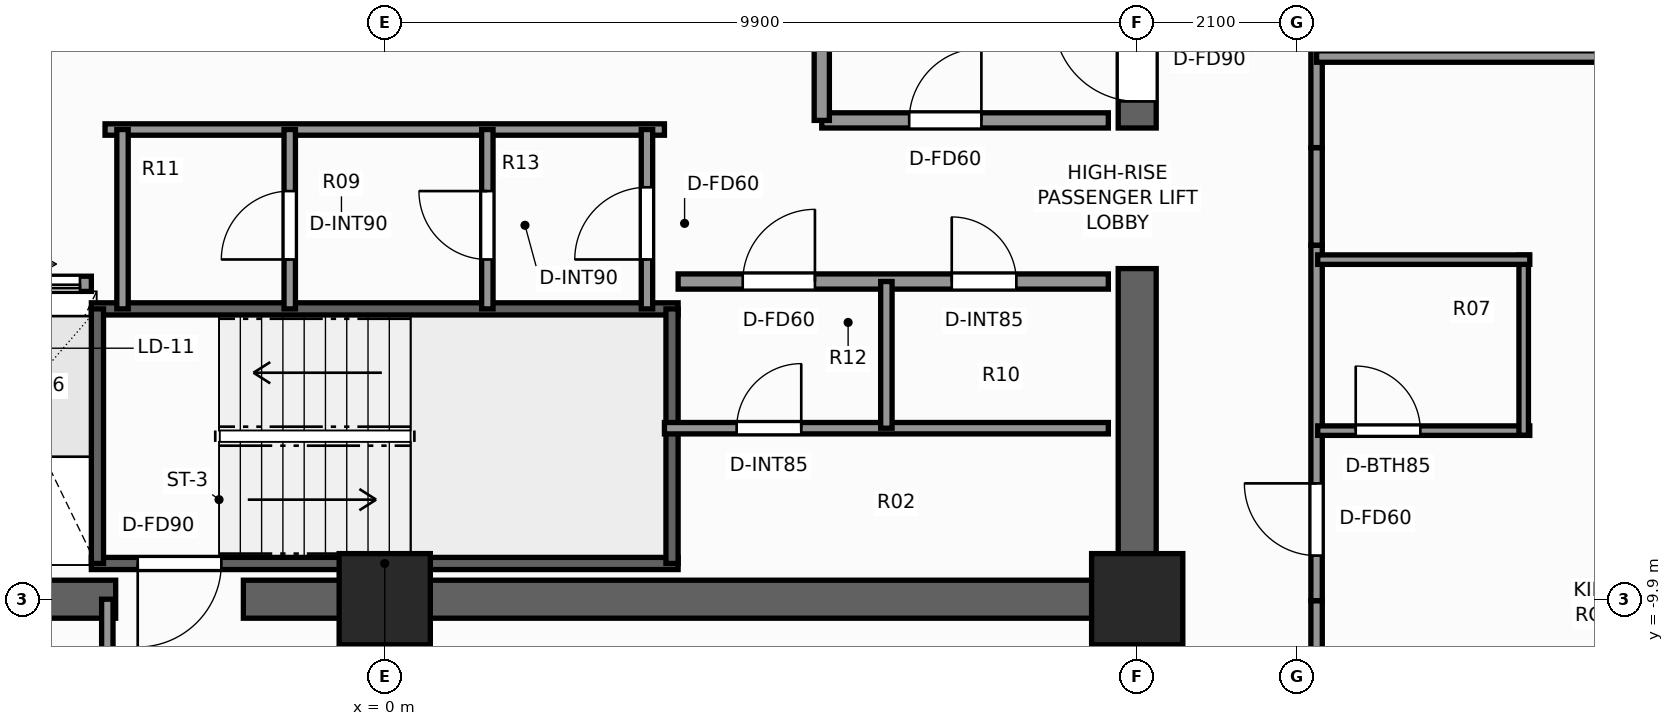
"""IFC4 building model, lengths in metres.
Left out: names, types, materials, properties, quantities, classifications, styles, units other than length and angle.
Written with IfcOpenShell. Run it as: python <this file> out.ifc"""

import sys

from ifc_helpers import new_model, si_unit, direction, frame, frame_2d, origin, origin_2d, place, context, subcontext, project, spatial, rectangle, extrude, element, fill, save


model = new_model("IFC4")
c1 = context("Model", 3, precision=1e-05, world=origin(), true_north=direction((0.0, 1.0)))
c2 = subcontext(c1, "Body", "Model", "MODEL_VIEW")
j1 = project(units=[si_unit("LENGTHUNIT", "METRE"), si_unit("PLANEANGLEUNIT", "RADIAN")], contexts=[c1])
p1 = place(None, origin())
s1 = spatial("IfcSite", under=j1, at=p1, CompositionType="ELEMENT")
p2 = place(p1, origin())
s2 = spatial("IfcBuilding", under=s1, at=p2, CompositionType="ELEMENT")
p3 = place(p2, frame((0.0, 0.0, 125.0)))
s3 = spatial("IfcBuildingStorey", under=s2, at=p3, CompositionType="ELEMENT", Elevation=125.0)
p4 = place(p3, frame((10.15, -9.9, 0.0), z_axis=(0.0, 0.0, 1.0), x_axis=(-1.0, 0.0, 0.0)))
e1 = element("IfcWall", 1, at=p4, inside=s3, PredefinedType="SHEAR", context=c2, shape_type="SweptSolid", body=[
    extrude(rectangle(XDim=12.01, YDim=0.5, at=frame_2d((6.005, 0.0))), origin(), (0.0, 0.0, 1.0), 3.3),
])
p5 = place(p3, frame((-3.54, -9.9, 0.0), z_axis=(0.0, 0.0, 1.0), x_axis=(-1.0, 0.0, 0.0)))
e2 = element("IfcWall", 2, at=p5, inside=s3, PredefinedType="SHEAR", context=c2, shape_type="SweptSolid", body=[
    extrude(rectangle(XDim=6.61, YDim=0.5, at=frame_2d((3.305, 0.0))), origin(), (0.0, 0.0, 1.0), 3.3),
])
p6 = place(p3, frame((9.9, -9.65, 0.0), z_axis=(0.0, 0.0, 1.0), x_axis=(0.0, 1.0, 0.0)))
e3 = element("IfcWall", 3, at=p6, inside=s3, PredefinedType="SHEAR", context=c2, shape_type="SweptSolid", body=[
    extrude(rectangle(XDim=4.1, YDim=0.5, at=frame_2d((2.05, 0.0))), origin(), (0.0, 0.0, 1.0), 3.3),
])
p7 = place(p3, frame((9.9, -3.7, 0.0), z_axis=(0.0, 0.0, 1.0), x_axis=(0.0, 1.0, 0.0)))
e4 = element("IfcWall", 4, at=p7, inside=s3, PredefinedType="SHEAR", context=c2, shape_type="SweptSolid", body=[
    extrude(rectangle(XDim=13.35, YDim=0.5, at=frame_2d((6.675, 0.0))), origin(), (0.0, 0.0, 1.0), 3.3),
])
p8 = place(p7, frame((0.35, 0.0, 0.0)))
e5 = element("IfcOpeningElement", 5, at=p8, cuts=e4, PredefinedType="OPENING", context=c2, shape_type="SweptSolid", body=[
    extrude(rectangle(XDim=1.1, YDim=2.2, at=frame_2d((0.55, 1.1))), frame((0.0, 0.26, 0.0), z_axis=(0.0, -1.0, 0.0), x_axis=(1.0, 0.0, 0.0)), (0.0, 0.0, 1.0), 0.52),
])
for number, where, z_axis, x_axis in (
    (6, (9.9, -9.9, 0.0), (0.0, 0.0, 1.0), (1.0, 0.0, 0.0)),
    (7, (0.0, -9.9, 0.0), (0.0, 0.0, 1.0), (1.0, 0.0, 0.0)),
):
    element("IfcColumn", number, at=place(p3, frame(where, z_axis=z_axis, x_axis=x_axis)), inside=s3, PredefinedType="COLUMN", context=c2, shape_type="SweptSolid", body=[
        extrude(rectangle(XDim=1.2, YDim=1.2, at=origin_2d()), origin(), (0.0, 0.0, 1.0), 3.3),
    ])
p9 = place(p3, frame((3.86, -9.43, 0.0), z_axis=(0.0, 0.0, 1.0), x_axis=(-1.0, 0.0, 0.0)))
e8 = element("IfcWall", 8, at=p9, inside=s3, PredefinedType="SHEAR", context=c2, shape_type="SweptSolid", body=[
    extrude(rectangle(XDim=7.72, YDim=0.16, at=frame_2d((3.86, 0.0))), origin(), (0.0, 0.0, 1.0), 3.3),
])
p10 = place(p9, frame((6.01, 0.0, 0.0)))
e9 = element("IfcOpeningElement", 9, at=p10, cuts=e8, PredefinedType="OPENING", context=c2, shape_type="SweptSolid", body=[
    extrude(rectangle(XDim=1.1, YDim=2.2, at=frame_2d((0.55, 1.1))), frame((0.0, 0.09, 0.0), z_axis=(0.0, -1.0, 0.0), x_axis=(1.0, 0.0, 0.0)), (0.0, 0.0, 1.0), 0.18),
])
p11 = place(p3, frame((-3.86, -6.08, 0.0), z_axis=(0.0, 0.0, 1.0), x_axis=(1.0, 0.0, 0.0)))
e10 = element("IfcWall", 10, at=p11, inside=s3, PredefinedType="SHEAR", context=c2, shape_type="SweptSolid", body=[
    extrude(rectangle(XDim=7.72, YDim=0.16, at=frame_2d((3.86, 0.0))), origin(), (0.0, 0.0, 1.0), 3.3),
])
for number, where, z_axis, x_axis in (
    (11, (-3.78, -9.43, 0.0), (0.0, 0.0, 1.0), (0.0, 1.0, 0.0)),
    (12, (3.78, -9.43, 0.0), (0.0, 0.0, 1.0), (0.0, 1.0, 0.0)),
):
    element("IfcWall", number, at=place(p3, frame(where, z_axis=z_axis, x_axis=x_axis)), inside=s3, PredefinedType="SHEAR", context=c2, shape_type="SweptSolid", body=[
        extrude(rectangle(XDim=3.35, YDim=0.16, at=frame_2d((1.675, 0.0))), origin(), (0.0, 0.0, 1.0), 3.3),
    ])
p12 = place(p3, frame((5.75, -3.6, 0.0), z_axis=(0.0, 0.0, 1.0), x_axis=(1.0, 0.0, 0.0)))
e13 = element("IfcWall", 13, at=p12, inside=s3, PredefinedType="SOLIDWALL", context=c2, shape_type="SweptSolid", body=[
    extrude(rectangle(XDim=3.77, YDim=0.2, at=frame_2d((1.885, 0.0))), origin(), (0.0, 0.0, 1.0), 3.1),
])
p13 = place(p12, frame((1.15, 0.0, 0.0)))
e14 = element("IfcOpeningElement", 14, at=p13, cuts=e13, PredefinedType="OPENING", context=c2, shape_type="SweptSolid", body=[
    extrude(rectangle(XDim=0.95, YDim=2.06, at=frame_2d((0.475, 1.03))), frame((0.0, 0.11, 0.0), z_axis=(0.0, -1.0, 0.0), x_axis=(1.0, 0.0, 0.0)), (0.0, 0.0, 1.0), 0.22),
])
p14 = place(p3, frame((5.75, -3.6, 0.0), z_axis=(0.0, 0.0, 1.0), x_axis=(0.0, 1.0, 0.0)))
e15 = element("IfcWall", 15, at=p14, inside=s3, PredefinedType="SOLIDWALL", context=c2, shape_type="SweptSolid", body=[
    extrude(rectangle(XDim=5.57, YDim=0.2, at=frame_2d((2.785, 0.0))), origin(), (0.0, 0.0, 1.0), 2.735),
])
p15 = place(p14, frame((2.75, 0.0, 0.0)))
e16 = element("IfcOpeningElement", 16, at=p15, cuts=e15, PredefinedType="OPENING", context=c2, shape_type="SweptSolid", body=[
    extrude(rectangle(XDim=1.1, YDim=2.2, at=frame_2d((0.55, 1.1))), frame((0.0, 0.11, 0.0), z_axis=(0.0, -1.0, 0.0), x_axis=(1.0, 0.0, 0.0)), (0.0, 0.0, 1.0), 0.22),
])
p16 = place(p3, frame((-9.52, -5.75, 0.0), z_axis=(0.0, 0.0, 1.0), x_axis=(1.0, 0.0, 0.0)))
e17 = element("IfcWall", 17, at=p16, inside=s3, PredefinedType="SOLIDWALL", context=c2, shape_type="SweptSolid", body=[
    extrude(rectangle(XDim=5.66, YDim=0.2, at=frame_2d((2.83, 0.0))), origin(), (0.0, 0.0, 1.0), 3.1),
])
p17 = place(p16, frame((0.55, 0.0, 0.0)))
e18 = element("IfcOpeningElement", 18, at=p17, cuts=e17, PredefinedType="OPENING", context=c2, shape_type="SweptSolid", body=[
    extrude(rectangle(XDim=1.1, YDim=2.2, at=frame_2d((0.55, 1.1))), frame((0.0, 0.11, 0.0), z_axis=(0.0, -1.0, 0.0), x_axis=(1.0, 0.0, 0.0)), (0.0, 0.0, 1.0), 0.22),
])
p18 = place(p16, frame((2.48, 0.0, 0.0)))
e19 = element("IfcOpeningElement", 19, at=p18, cuts=e17, PredefinedType="OPENING", context=c2, shape_type="SweptSolid", body=[
    extrude(rectangle(XDim=1.1, YDim=2.2, at=frame_2d((0.55, 1.1))), frame((0.0, 0.11, 0.0), z_axis=(0.0, -1.0, 0.0), x_axis=(1.0, 0.0, 0.0)), (0.0, 0.0, 1.0), 0.22),
])
p19 = place(p16, frame((4.41, 0.0, 0.0)))
e20 = element("IfcOpeningElement", 20, at=p19, cuts=e17, PredefinedType="OPENING", context=c2, shape_type="SweptSolid", body=[
    extrude(rectangle(XDim=1.1, YDim=2.2, at=frame_2d((0.55, 1.1))), frame((0.0, 0.11, 0.0), z_axis=(0.0, -1.0, 0.0), x_axis=(1.0, 0.0, 0.0)), (0.0, 0.0, 1.0), 0.22),
])
p20 = place(p3, frame((3.86, -5.72, 0.0), z_axis=(0.0, 0.0, 1.0), x_axis=(1.0, 0.0, 0.0)))
e21 = element("IfcWall", 21, at=p20, inside=s3, PredefinedType="SOLIDWALL", context=c2, shape_type="SweptSolid", body=[
    extrude(rectangle(XDim=5.66, YDim=0.2, at=frame_2d((2.83, 0.0))), origin(), (0.0, 0.0, 1.0), 3.1),
])
p21 = place(p20, frame((0.85, 0.0, 0.0)))
e22 = element("IfcOpeningElement", 22, at=p21, cuts=e21, PredefinedType="OPENING", context=c2, shape_type="SweptSolid", body=[
    extrude(rectangle(XDim=0.95, YDim=2.06, at=frame_2d((0.475, 1.03))), frame((0.0, 0.11, 0.0), z_axis=(0.0, -1.0, 0.0), x_axis=(1.0, 0.0, 0.0)), (0.0, 0.0, 1.0), 0.22),
])
p22 = place(p20, frame((3.6, 0.0, 0.0)))
e23 = element("IfcOpeningElement", 23, at=p22, cuts=e21, PredefinedType="OPENING", context=c2, shape_type="SweptSolid", body=[
    extrude(rectangle(XDim=0.85, YDim=2.03, at=frame_2d((0.425, 1.015))), frame((0.0, 0.11, 0.0), z_axis=(0.0, -1.0, 0.0), x_axis=(1.0, 0.0, 0.0)), (0.0, 0.0, 1.0), 0.22),
])
p23 = place(p3, frame((3.68, -7.65, 0.0), z_axis=(0.0, 0.0, 1.0), x_axis=(1.0, 0.0, 0.0)))
e24 = element("IfcWall", 24, at=p23, inside=s3, PredefinedType="PARTITIONING", context=c2, shape_type="SweptSolid", body=[
    extrude(rectangle(XDim=5.84, YDim=0.15, at=frame_2d((2.92, 0.0))), origin(), (0.0, 0.0, 1.0), 3.1),
])
p24 = place(p23, frame((0.95, 0.0, 0.0)))
e25 = element("IfcOpeningElement", 25, at=p24, cuts=e24, PredefinedType="OPENING", context=c2, shape_type="SweptSolid", body=[
    extrude(rectangle(XDim=0.85, YDim=2.03, at=frame_2d((0.425, 1.015))), frame((0.0, 0.085, 0.0), z_axis=(0.0, -1.0, 0.0), x_axis=(1.0, 0.0, 0.0)), (0.0, 0.0, 1.0), 0.17),
])
p25 = place(p3, frame((6.6, -7.65, 0.0), z_axis=(0.0, 0.0, 1.0), x_axis=(0.0, 1.0, 0.0)))
e26 = element("IfcWall", 26, at=p25, inside=s3, PredefinedType="PARTITIONING", context=c2, shape_type="SweptSolid", body=[
    extrude(rectangle(XDim=1.93, YDim=0.15, at=frame_2d((0.965, 0.0))), origin(), (0.0, 0.0, 1.0), 3.1),
])
p26 = place(p3, frame((-3.68, -3.72, 0.0), z_axis=(0.0, 0.0, 1.0), x_axis=(1.0, 0.0, 0.0)))
e27 = element("IfcWall", 27, at=p26, inside=s3, PredefinedType="PARTITIONING", context=c2, shape_type="SweptSolid", body=[
    extrude(rectangle(XDim=7.36, YDim=0.15, at=frame_2d((3.68, 0.0))), origin(), (0.0, 0.0, 1.0), 3.1),
])
p27 = place(p3, frame((3.45, -6.08, 0.0), z_axis=(0.0, 0.0, 1.0), x_axis=(0.0, 1.0, 0.0)))
e28 = element("IfcWall", 28, at=p27, inside=s3, PredefinedType="PARTITIONING", context=c2, shape_type="SweptSolid", body=[
    extrude(rectangle(XDim=2.36, YDim=0.15, at=frame_2d((1.18, 0.0))), origin(), (0.0, 0.0, 1.0), 3.1),
])
p28 = place(p27, frame((0.65, 0.0, 0.0)))
e29 = element("IfcOpeningElement", 29, at=p28, cuts=e28, PredefinedType="OPENING", context=c2, shape_type="SweptSolid", body=[
    extrude(rectangle(XDim=0.95, YDim=2.06, at=frame_2d((0.475, 1.03))), frame((0.0, 0.085, 0.0), z_axis=(0.0, -1.0, 0.0), x_axis=(1.0, 0.0, 0.0)), (0.0, 0.0, 1.0), 0.17),
])
p29 = place(p3, frame((-3.45, -6.08, 0.0), z_axis=(0.0, 0.0, 1.0), x_axis=(0.0, 1.0, 0.0)))
e30 = element("IfcWall", 30, at=p29, inside=s3, PredefinedType="PARTITIONING", context=c2, shape_type="SweptSolid", body=[
    extrude(rectangle(XDim=2.36, YDim=0.15, at=frame_2d((1.18, 0.0))), origin(), (0.0, 0.0, 1.0), 3.1),
])
p30 = place(p3, frame((1.35, -6.08, 0.0), z_axis=(0.0, 0.0, 1.0), x_axis=(0.0, 1.0, 0.0)))
e31 = element("IfcWall", 31, at=p30, inside=s3, PredefinedType="PARTITIONING", context=c2, shape_type="SweptSolid", body=[
    extrude(rectangle(XDim=2.36, YDim=0.15, at=frame_2d((1.18, 0.0))), origin(), (0.0, 0.0, 1.0), 3.1),
])
p31 = place(p30, frame((0.65, 0.0, 0.0)))
e32 = element("IfcOpeningElement", 32, at=p31, cuts=e31, PredefinedType="OPENING", context=c2, shape_type="SweptSolid", body=[
    extrude(rectangle(XDim=0.9, YDim=2.06, at=frame_2d((0.45, 1.03))), frame((0.0, 0.085, 0.0), z_axis=(0.0, -1.0, 0.0), x_axis=(1.0, 0.0, 0.0)), (0.0, 0.0, 1.0), 0.17),
])
p32 = place(p3, frame((-1.25, -6.08, 0.0), z_axis=(0.0, 0.0, 1.0), x_axis=(0.0, 1.0, 0.0)))
e33 = element("IfcWall", 33, at=p32, inside=s3, PredefinedType="PARTITIONING", context=c2, shape_type="SweptSolid", body=[
    extrude(rectangle(XDim=2.36, YDim=0.15, at=frame_2d((1.18, 0.0))), origin(), (0.0, 0.0, 1.0), 3.1),
])
p33 = place(p32, frame((0.65, 0.0, 0.0)))
e34 = element("IfcOpeningElement", 34, at=p33, cuts=e33, PredefinedType="OPENING", context=c2, shape_type="SweptSolid", body=[
    extrude(rectangle(XDim=0.9, YDim=2.06, at=frame_2d((0.45, 1.03))), frame((0.0, 0.085, 0.0), z_axis=(0.0, -1.0, 0.0), x_axis=(1.0, 0.0, 0.0)), (0.0, 0.0, 1.0), 0.17),
])
p34 = place(p3, frame((12.26, -11.311, 0.0), z_axis=(0.0, 0.0, 1.0), x_axis=(0.0, 1.0, 0.0)))
e35 = element("IfcWall", 35, at=p34, inside=s3, PredefinedType="PARTITIONING", context=c2, shape_type="SweptSolid", body=[
    extrude(rectangle(XDim=1.392, YDim=0.15, at=frame_2d((0.696, 0.0))), origin(), (0.0, 0.0, 1.0), 1.285),
])
p35 = place(p3, frame((12.26, -9.919, 0.0), z_axis=(0.0, 0.0, 1.0), x_axis=(0.0, 1.0, 0.0)))
e36 = element("IfcWall", 36, at=p35, inside=s3, PredefinedType="PARTITIONING", context=c2, shape_type="SweptSolid", body=[
    extrude(rectangle(XDim=4.677, YDim=0.15, at=frame_2d((2.338, 0.0))), origin(), (0.0, 0.0, 1.0), 3.1),
])
p36 = place(p35, frame((0.593, 0.0, 0.0)))
e37 = element("IfcOpeningElement", 37, at=p36, cuts=e36, PredefinedType="OPENING", context=c2, shape_type="SweptSolid", body=[
    extrude(rectangle(XDim=0.95, YDim=2.06, at=frame_2d((0.475, 1.03))), frame((0.0, 0.085, 0.0), z_axis=(0.0, -1.0, 0.0), x_axis=(1.0, 0.0, 0.0)), (0.0, 0.0, 1.0), 0.17),
])
p37 = place(p3, frame((12.26, -5.242, 0.0), z_axis=(0.0, 0.0, 1.0), x_axis=(0.0, 1.0, 0.0)))
e38 = element("IfcWall", 38, at=p37, inside=s3, PredefinedType="PARTITIONING", context=c2, shape_type="SweptSolid", body=[
    extrude(rectangle(XDim=1.284, YDim=0.15, at=frame_2d((0.642, 0.0))), origin(), (0.0, 0.0, 1.0), 1.285),
])
p38 = place(p3, frame((12.26, -3.958, 0.0), z_axis=(0.0, 0.0, 1.0), x_axis=(0.0, 1.0, 0.0)))
e39 = element("IfcWall", 39, at=p38, inside=s3, PredefinedType="PARTITIONING", context=c2, shape_type="SweptSolid", body=[
    extrude(rectangle(XDim=7.916, YDim=0.15, at=frame_2d((3.958, 0.0))), origin(), (0.0, 0.0, 1.0), 2.389),
])
p39 = place(p3, frame((-3.65, -12.58, 0.0), z_axis=(0.0, 0.0, 1.0), x_axis=(0.0, 1.0, 0.0)))
e40 = element("IfcWall", 40, at=p39, inside=s3, PredefinedType="PARTITIONING", context=c2, shape_type="SweptSolid", body=[
    extrude(rectangle(XDim=2.68, YDim=0.15, at=frame_2d((1.34, 0.0))), origin(), (0.0, 0.0, 1.0), 3.1),
])
p40 = place(p3, frame((12.26, -2.76, 0.0), z_axis=(0.0, 0.0, 1.0), x_axis=(1.0, 0.0, 0.0)))
e41 = element("IfcWall", 41, at=p40, inside=s3, PredefinedType="PARTITIONING", context=c2, shape_type="SweptSolid", body=[
    extrude(rectangle(XDim=6.82, YDim=0.15, at=frame_2d((3.41, 0.0))), origin(), (0.0, 0.0, 1.0), 2.469),
])
p41 = place(p3, frame((12.275, -7.682, 0.0), z_axis=(0.0, 0.0, 1.0), x_axis=(1.0, 0.0, 0.0)))
e42 = element("IfcWall", 42, at=p41, inside=s3, PredefinedType="PARTITIONING", context=c2, shape_type="SweptSolid", body=[
    extrude(rectangle(XDim=2.79, YDim=0.125, at=frame_2d((1.395, 0.0))), origin(), (0.0, 0.0, 1.0), 3.1),
])
p42 = place(p41, frame((0.5, 0.0, 0.0)))
e43 = element("IfcOpeningElement", 43, at=p42, cuts=e42, PredefinedType="OPENING", context=c2, shape_type="SweptSolid", body=[
    extrude(rectangle(XDim=0.85, YDim=2.03, at=frame_2d((0.425, 1.015))), frame((0.0, 0.073, 0.0), z_axis=(0.0, -1.0, 0.0), x_axis=(1.0, 0.0, 0.0)), (0.0, 0.0, 1.0), 0.145),
])
p43 = place(p3, frame((14.985, -7.742, 0.0), z_axis=(0.0, 0.0, 1.0), x_axis=(0.0, 1.0, 0.0)))
e44 = element("IfcWall", 44, at=p43, inside=s3, PredefinedType="PARTITIONING", context=c2, shape_type="SweptSolid", body=[
    extrude(rectangle(XDim=2.37, YDim=0.125, at=frame_2d((1.185, 0.0))), origin(), (0.0, 0.0, 1.0), 3.1),
])
p44 = place(p3, frame((12.275, -5.432, 0.0), z_axis=(0.0, 0.0, 1.0), x_axis=(1.0, 0.0, 0.0)))
e45 = element("IfcWall", 45, at=p44, inside=s3, PredefinedType="PARTITIONING", context=c2, shape_type="SweptSolid", body=[
    extrude(rectangle(XDim=2.79, YDim=0.125, at=frame_2d((1.395, 0.0))), origin(), (0.0, 0.0, 1.0), 3.1),
])
p45 = place(p10, origin())
e46 = element("IfcDoor", 46, at=p45, inside=s3, OperationType="SINGLE_SWING_RIGHT", PredefinedType="DOOR", context=c2, shape_type="SweptSolid", body=[
    extrude(rectangle(XDim=1.1, YDim=2.2, at=frame_2d((0.55, 1.1))), frame((0.0, 0.025, 0.0), z_axis=(0.0, -1.0, 0.0), x_axis=(1.0, 0.0, 0.0)), (0.0, 0.0, 1.0), 0.05),
])
fill(e9, e46)
p46 = place(p8, origin())
e47 = element("IfcDoor", 47, at=p46, inside=s3, OperationType="SINGLE_SWING_RIGHT", PredefinedType="DOOR", context=c2, shape_type="SweptSolid", body=[
    extrude(rectangle(XDim=1.1, YDim=2.2, at=frame_2d((0.55, 1.1))), frame((0.0, 0.025, 0.0), z_axis=(0.0, -1.0, 0.0), x_axis=(1.0, 0.0, 0.0)), (0.0, 0.0, 1.0), 0.05),
])
fill(e5, e47)
p47 = place(p19, origin())
e48 = element("IfcDoor", 48, at=p47, inside=s3, OperationType="DOUBLE_DOOR_SLIDING", PredefinedType="DOOR", context=c2, shape_type="SweptSolid", body=[
    extrude(rectangle(XDim=1.1, YDim=2.2, at=frame_2d((0.55, 1.1))), frame((0.0, 0.025, 0.0), z_axis=(0.0, -1.0, 0.0), x_axis=(1.0, 0.0, 0.0)), (0.0, 0.0, 1.0), 0.05),
])
fill(e20, e48)
p48 = place(p21, origin())
e49 = element("IfcDoor", 49, at=p48, inside=s3, OperationType="SINGLE_SWING_RIGHT", PredefinedType="DOOR", context=c2, shape_type="SweptSolid", body=[
    extrude(rectangle(XDim=0.95, YDim=2.06, at=frame_2d((0.475, 1.03))), frame((0.0, 0.025, 0.0), z_axis=(0.0, -1.0, 0.0), x_axis=(1.0, 0.0, 0.0)), (0.0, 0.0, 1.0), 0.05),
])
fill(e22, e49)
p49 = place(p22, origin())
e50 = element("IfcDoor", 50, at=p49, inside=s3, OperationType="SINGLE_SWING_LEFT", PredefinedType="DOOR", context=c2, shape_type="SweptSolid", body=[
    extrude(rectangle(XDim=0.85, YDim=2.03, at=frame_2d((0.425, 1.015))), frame((0.0, 0.025, 0.0), z_axis=(0.0, -1.0, 0.0), x_axis=(1.0, 0.0, 0.0)), (0.0, 0.0, 1.0), 0.05),
])
fill(e23, e50)
p50 = place(p24, origin())
e51 = element("IfcDoor", 51, at=p50, inside=s3, OperationType="SINGLE_SWING_RIGHT", PredefinedType="DOOR", context=c2, shape_type="SweptSolid", body=[
    extrude(rectangle(XDim=0.85, YDim=2.03, at=frame_2d((0.425, 1.015))), frame((0.0, 0.025, 0.0), z_axis=(0.0, -1.0, 0.0), x_axis=(1.0, 0.0, 0.0)), (0.0, 0.0, 1.0), 0.05),
])
fill(e25, e51)
p51 = place(p13, origin())
e52 = element("IfcDoor", 52, at=p51, inside=s3, OperationType="SINGLE_SWING_RIGHT", PredefinedType="DOOR", context=c2, shape_type="SweptSolid", body=[
    extrude(rectangle(XDim=0.95, YDim=2.06, at=frame_2d((0.475, 1.03))), frame((0.0, 0.025, 0.0), z_axis=(0.0, -1.0, 0.0), x_axis=(1.0, 0.0, 0.0)), (0.0, 0.0, 1.0), 0.05),
])
fill(e14, e52)
p52 = place(p28, origin())
e53 = element("IfcDoor", 53, at=p52, inside=s3, OperationType="SINGLE_SWING_LEFT", PredefinedType="DOOR", context=c2, shape_type="SweptSolid", body=[
    extrude(rectangle(XDim=0.95, YDim=2.06, at=frame_2d((0.475, 1.03))), frame((0.0, 0.025, 0.0), z_axis=(0.0, -1.0, 0.0), x_axis=(1.0, 0.0, 0.0)), (0.0, 0.0, 1.0), 0.05),
])
fill(e29, e53)
p53 = place(p31, origin())
e54 = element("IfcDoor", 54, at=p53, inside=s3, OperationType="SINGLE_SWING_RIGHT", PredefinedType="DOOR", context=c2, shape_type="SweptSolid", body=[
    extrude(rectangle(XDim=0.9, YDim=2.06, at=frame_2d((0.45, 1.03))), frame((0.0, 0.025, 0.0), z_axis=(0.0, -1.0, 0.0), x_axis=(1.0, 0.0, 0.0)), (0.0, 0.0, 1.0), 0.05),
])
fill(e32, e54)
p54 = place(p33, origin())
e55 = element("IfcDoor", 55, at=p54, inside=s3, OperationType="SINGLE_SWING_LEFT", PredefinedType="DOOR", context=c2, shape_type="SweptSolid", body=[
    extrude(rectangle(XDim=0.9, YDim=2.06, at=frame_2d((0.45, 1.03))), frame((0.0, 0.025, 0.0), z_axis=(0.0, -1.0, 0.0), x_axis=(1.0, 0.0, 0.0)), (0.0, 0.0, 1.0), 0.05),
])
fill(e34, e55)
p55 = place(p42, origin())
e56 = element("IfcDoor", 56, at=p55, inside=s3, OperationType="SINGLE_SWING_LEFT", PredefinedType="DOOR", context=c2, shape_type="SweptSolid", body=[
    extrude(rectangle(XDim=0.85, YDim=2.03, at=frame_2d((0.425, 1.015))), frame((0.0, 0.025, 0.0), z_axis=(0.0, -1.0, 0.0), x_axis=(1.0, 0.0, 0.0)), (0.0, 0.0, 1.0), 0.05),
])
fill(e43, e56)
p56 = place(p36, origin())
e57 = element("IfcDoor", 57, at=p56, inside=s3, OperationType="SINGLE_SWING_RIGHT", PredefinedType="DOOR", context=c2, shape_type="SweptSolid", body=[
    extrude(rectangle(XDim=0.95, YDim=2.06, at=frame_2d((0.475, 1.03))), frame((0.0, 0.025, 0.0), z_axis=(0.0, -1.0, 0.0), x_axis=(1.0, 0.0, 0.0)), (0.0, 0.0, 1.0), 0.05),
])
fill(e37, e57)
save(model, sys.argv[1])
